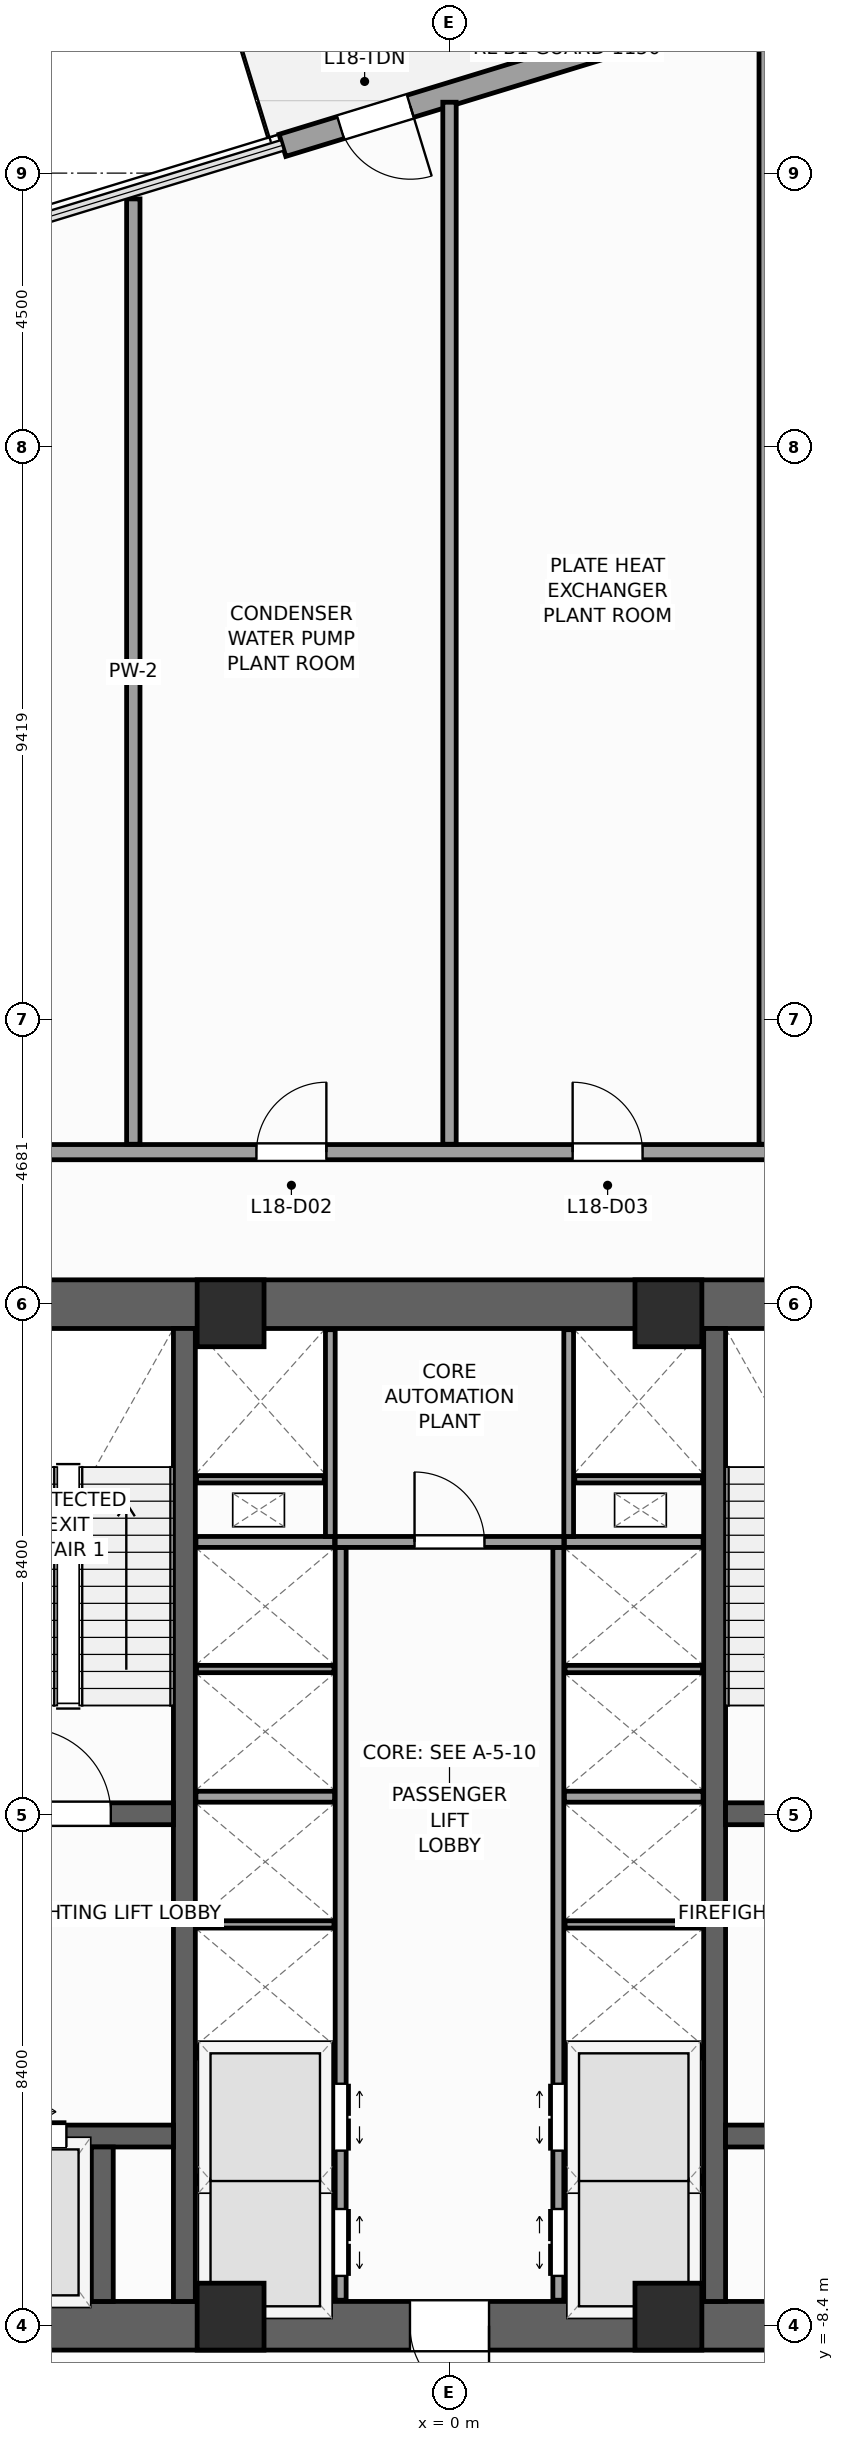
"""IFC4 building model, lengths in metres.
Left out: names, types, materials, properties, quantities, classifications, styles, units other than length and angle.
Written with IfcOpenShell. Run it as: python <this file> out.ifc"""

import sys

from ifc_helpers import new_model, si_unit, direction, frame, frame_2d, origin, origin_2d, place, context, subcontext, project, spatial, rectangle, extrude, source, transform, mapped, element, fill, save


model = new_model("IFC4")
c1 = context("Model", 3, precision=1e-05, world=origin(), true_north=direction((0.0, 1.0)))
c2 = subcontext(c1, "Body", "Model", "MODEL_VIEW")
j1 = project(units=[si_unit("LENGTHUNIT", "METRE"), si_unit("PLANEANGLEUNIT", "RADIAN")], contexts=[c1])
p1 = place(None, origin())
s1 = spatial("IfcSite", under=j1, at=p1, CompositionType="ELEMENT")
p2 = place(p1, origin())
s2 = spatial("IfcBuilding", under=s1, at=p2, CompositionType="ELEMENT")
p3 = place(p2, frame((0.0, 0.0, 78.0)))
s3 = spatial("IfcBuildingStorey", under=s2, at=p3, CompositionType="ELEMENT", Elevation=78.0)
p4 = place(p3, frame((-8.8, -8.4, 0.0), z_axis=(0.0, 0.0, 1.0), x_axis=(1.0, 0.0, 0.0)))
e1 = element("IfcWall", 1, at=p4, inside=s3, PredefinedType="SHEAR", context=c2, shape_type="SweptSolid", body=[
    extrude(rectangle(XDim=17.6, YDim=0.8, at=frame_2d((8.8, 0.0))), origin(), (0.0, 0.0, 1.0), 5.2),
])
p5 = place(p4, frame((8.15, 0.0, 0.0)))
e2 = element("IfcOpeningElement", 2, at=p5, cuts=e1, PredefinedType="OPENING", context=c2, shape_type="SweptSolid", body=[
    extrude(rectangle(XDim=1.3, YDim=2.2, at=frame_2d((0.65, 1.1))), frame((0.0, 0.41, 0.0), z_axis=(0.0, -1.0, 0.0), x_axis=(1.0, 0.0, 0.0)), (0.0, 0.0, 1.0), 0.82),
])
p6 = place(p3, frame((-8.8, 8.4, 0.0), z_axis=(0.0, 0.0, 1.0), x_axis=(1.0, 0.0, 0.0)))
e3 = element("IfcWall", 3, at=p6, inside=s3, PredefinedType="SHEAR", context=c2, shape_type="SweptSolid", body=[
    extrude(rectangle(XDim=17.6, YDim=0.8, at=frame_2d((8.8, 0.0))), origin(), (0.0, 0.0, 1.0), 5.2),
])
for number, where, z_axis, x_axis in (
    (4, (-4.36, -8.0, 0.0), (0.0, 0.0, 1.0), (0.0, 1.0, 0.0)),
    (5, (4.36, -8.0, 0.0), (0.0, 0.0, 1.0), (0.0, 1.0, 0.0)),
):
    element("IfcWall", number, at=place(p3, frame(where, z_axis=z_axis, x_axis=x_axis)), inside=s3, PredefinedType="SHEAR", context=c2, shape_type="SweptSolid", body=[
        extrude(rectangle(XDim=16.0, YDim=0.36, at=frame_2d((8.0, 0.0))), origin(), (0.0, 0.0, 1.0), 5.2),
    ])
p7 = place(p3, frame((-8.0, 0.02, 0.0), z_axis=(0.0, 0.0, 1.0), x_axis=(1.0, 0.0, 0.0)))
e6 = element("IfcWall", 6, at=p7, inside=s3, PredefinedType="SHEAR", context=c2, shape_type="SweptSolid", body=[
    extrude(rectangle(XDim=3.46, YDim=0.36, at=frame_2d((1.73, 0.0))), origin(), (0.0, 0.0, 1.0), 5.2),
])
p8 = place(p7, frame((1.03, 0.0, 0.0)))
e7 = element("IfcOpeningElement", 7, at=p8, cuts=e6, PredefinedType="OPENING", context=c2, shape_type="SweptSolid", body=[
    extrude(rectangle(XDim=1.4, YDim=2.2, at=frame_2d((0.7, 1.1))), frame((0.0, 0.19, 0.0), z_axis=(0.0, -1.0, 0.0), x_axis=(1.0, 0.0, 0.0)), (0.0, 0.0, 1.0), 0.38),
])
p9 = place(p3, frame((4.54, 0.02, 0.0), z_axis=(0.0, 0.0, 1.0), x_axis=(1.0, 0.0, 0.0)))
e8 = element("IfcWall", 8, at=p9, inside=s3, PredefinedType="SHEAR", context=c2, shape_type="SweptSolid", body=[
    extrude(rectangle(XDim=3.46, YDim=0.36, at=frame_2d((1.73, 0.0))), origin(), (0.0, 0.0, 1.0), 5.2),
])
p10 = place(p9, frame((1.03, 0.0, 0.0)))
e9 = element("IfcOpeningElement", 9, at=p10, cuts=e8, PredefinedType="OPENING", context=c2, shape_type="SweptSolid", body=[
    extrude(rectangle(XDim=1.4, YDim=2.2, at=frame_2d((0.7, 1.1))), frame((0.0, 0.19, 0.0), z_axis=(0.0, -1.0, 0.0), x_axis=(1.0, 0.0, 0.0)), (0.0, 0.0, 1.0), 0.38),
])
p11 = place(p3, frame((-8.0, -5.28, 0.0), z_axis=(0.0, 0.0, 1.0), x_axis=(1.0, 0.0, 0.0)))
e10 = element("IfcWall", 10, at=p11, inside=s3, PredefinedType="SHEAR", context=c2, shape_type="SweptSolid", body=[
    extrude(rectangle(XDim=3.46, YDim=0.36, at=frame_2d((1.73, 0.0))), origin(), (0.0, 0.0, 1.0), 5.2),
])
p12 = place(p11, frame((0.5, 0.0, 0.0)))
e11 = element("IfcOpeningElement", 11, at=p12, cuts=e10, PredefinedType="OPENING", context=c2, shape_type="SweptSolid", body=[
    extrude(rectangle(XDim=1.2, YDim=2.25, at=frame_2d((0.6, 1.125))), frame((0.0, 0.19, 0.0), z_axis=(0.0, -1.0, 0.0), x_axis=(1.0, 0.0, 0.0)), (0.0, 0.0, 1.0), 0.38),
])
p13 = place(p3, frame((4.54, -5.28, 0.0), z_axis=(0.0, 0.0, 1.0), x_axis=(1.0, 0.0, 0.0)))
e12 = element("IfcWall", 12, at=p13, inside=s3, PredefinedType="SHEAR", context=c2, shape_type="SweptSolid", body=[
    extrude(rectangle(XDim=3.46, YDim=0.36, at=frame_2d((1.73, 0.0))), origin(), (0.0, 0.0, 1.0), 5.2),
])
p14 = place(p13, frame((1.76, 0.0, 0.0)))
e13 = element("IfcOpeningElement", 13, at=p14, cuts=e12, PredefinedType="OPENING", context=c2, shape_type="SweptSolid", body=[
    extrude(rectangle(XDim=1.2, YDim=2.25, at=frame_2d((0.6, 1.125))), frame((0.0, 0.19, 0.0), z_axis=(0.0, -1.0, 0.0), x_axis=(1.0, 0.0, 0.0)), (0.0, 0.0, 1.0), 0.38),
])
p15 = place(p3, frame((-5.71, -8.0, 0.0), z_axis=(0.0, 0.0, 1.0), x_axis=(0.0, 1.0, 0.0)))
e14 = element("IfcWall", 14, at=p15, inside=s3, PredefinedType="SHEAR", context=c2, shape_type="SweptSolid", body=[
    extrude(rectangle(XDim=2.54, YDim=0.36, at=frame_2d((1.27, 0.0))), origin(), (0.0, 0.0, 1.0), 5.2),
])
m1 = source(origin(), c2, "Body", "SweptSolid", [
    extrude(rectangle(XDim=1.1, YDim=1.1, at=origin_2d()), origin(), (0.0, 0.0, 1.0), 5.2),
])
for number, where, z_axis, x_axis in (
    (15, (-3.6, -8.25, 0.0), (0.0, 0.0, 1.0), (1.0, 0.0, 0.0)),
    (16, (3.6, -8.25, 0.0), (0.0, 0.0, 1.0), (1.0, 0.0, 0.0)),
    (17, (-3.6, 8.25, 0.0), (0.0, 0.0, 1.0), (1.0, 0.0, 0.0)),
    (18, (3.6, 8.25, 0.0), (0.0, 0.0, 1.0), (1.0, 0.0, 0.0)),
):
    element("IfcColumn", number, at=place(p3, frame(where, z_axis=z_axis, x_axis=x_axis)), inside=s3, PredefinedType="PILASTER", context=c2, shape_type="MappedRepresentation", body=[
        mapped(m1, transform((0.0, 0.0, 0.0), scale=1.0)),
    ])
p16 = place(p3, frame((14.265, 32.658, 0.0), z_axis=(0.0, 0.0, 1.0), x_axis=(-0.956302978664, -0.292377517944, 0.0)))
e19 = element("IfcWall", 19, at=p16, inside=s3, PredefinedType="STANDARD", context=c2, shape_type="SweptSolid", body=[
    extrude(rectangle(XDim=17.79, YDim=0.38, at=frame_2d((8.895, 0.0))), origin(), (0.0, 0.0, 1.0), 4.34),
])
p17 = place(p16, frame((15.59, 0.0, 0.0)))
e20 = element("IfcOpeningElement", 20, at=p17, cuts=e19, PredefinedType="OPENING", context=c2, shape_type="SweptSolid", body=[
    extrude(rectangle(XDim=1.2, YDim=2.3, at=frame_2d((0.6, 1.15))), frame((0.0, 0.2, 0.0), z_axis=(0.0, -1.0, 0.0), x_axis=(1.0, 0.0, 0.0)), (0.0, 0.0, 1.0), 0.4),
])
p18 = place(p3, frame((-1.79, -7.98, 0.0), z_axis=(0.0, 0.0, 1.0), x_axis=(0.0, 1.0, 0.0)))
e21 = element("IfcWall", 21, at=p18, inside=s3, PredefinedType="PARTITIONING", context=c2, shape_type="SweptSolid", body=[
    extrude(rectangle(XDim=12.38, YDim=0.18, at=frame_2d((6.19, 0.0))), origin(), (0.0, 0.0, 1.0), 4.94),
])
p19 = place(p18, frame((0.4, 0.0, 0.0)))
e22 = element("IfcOpeningElement", 22, at=p19, cuts=e21, PredefinedType="OPENING", context=c2, shape_type="SweptSolid", body=[
    extrude(rectangle(XDim=1.1, YDim=2.2, at=frame_2d((0.55, 1.1))), frame((0.0, 0.1, 0.0), z_axis=(0.0, -1.0, 0.0), x_axis=(1.0, 0.0, 0.0)), (0.0, 0.0, 1.0), 0.2),
])
p20 = place(p18, frame((2.46, 0.0, 0.0)))
e23 = element("IfcOpeningElement", 23, at=p20, cuts=e21, PredefinedType="OPENING", context=c2, shape_type="SweptSolid", body=[
    extrude(rectangle(XDim=1.1, YDim=2.2, at=frame_2d((0.55, 1.1))), frame((0.0, 0.1, 0.0), z_axis=(0.0, -1.0, 0.0), x_axis=(1.0, 0.0, 0.0)), (0.0, 0.0, 1.0), 0.2),
])
p21 = place(p3, frame((1.79, -7.98, 0.0), z_axis=(0.0, 0.0, 1.0), x_axis=(0.0, 1.0, 0.0)))
e24 = element("IfcWall", 24, at=p21, inside=s3, PredefinedType="PARTITIONING", context=c2, shape_type="SweptSolid", body=[
    extrude(rectangle(XDim=12.38, YDim=0.18, at=frame_2d((6.19, 0.0))), origin(), (0.0, 0.0, 1.0), 4.94),
])
p22 = place(p21, frame((0.4, 0.0, 0.0)))
e25 = element("IfcOpeningElement", 25, at=p22, cuts=e24, PredefinedType="OPENING", context=c2, shape_type="SweptSolid", body=[
    extrude(rectangle(XDim=1.1, YDim=2.2, at=frame_2d((0.55, 1.1))), frame((0.0, 0.1, 0.0), z_axis=(0.0, -1.0, 0.0), x_axis=(1.0, 0.0, 0.0)), (0.0, 0.0, 1.0), 0.2),
])
p23 = place(p21, frame((2.46, 0.0, 0.0)))
e26 = element("IfcOpeningElement", 26, at=p23, cuts=e24, PredefinedType="OPENING", context=c2, shape_type="SweptSolid", body=[
    extrude(rectangle(XDim=1.1, YDim=2.2, at=frame_2d((0.55, 1.1))), frame((0.0, 0.1, 0.0), z_axis=(0.0, -1.0, 0.0), x_axis=(1.0, 0.0, 0.0)), (0.0, 0.0, 1.0), 0.2),
])
p24 = place(p3, frame((-1.88, 4.49, 0.0), z_axis=(0.0, 0.0, 1.0), x_axis=(1.0, 0.0, 0.0)))
e27 = element("IfcWall", 27, at=p24, inside=s3, PredefinedType="PARTITIONING", context=c2, shape_type="SweptSolid", body=[
    extrude(rectangle(XDim=3.76, YDim=0.18, at=frame_2d((1.88, 0.0))), origin(), (0.0, 0.0, 1.0), 4.94),
])
p25 = place(p24, frame((1.305, 0.0, 0.0)))
e28 = element("IfcOpeningElement", 28, at=p25, cuts=e27, PredefinedType="OPENING", context=c2, shape_type="SweptSolid", body=[
    extrude(rectangle(XDim=1.15, YDim=2.25, at=frame_2d((0.575, 1.125))), frame((0.0, 0.1, 0.0), z_axis=(0.0, -1.0, 0.0), x_axis=(1.0, 0.0, 0.0)), (0.0, 0.0, 1.0), 0.2),
])
for number, where, z_axis, x_axis in (
    (29, (-4.17, -3.9, 0.0), (0.0, 0.0, 1.0), (1.0, 0.0, 0.0)),
    (30, (1.89, -3.9, 0.0), (0.0, 0.0, 1.0), (1.0, 0.0, 0.0)),
    (31, (-4.17, 0.3, 0.0), (0.0, 0.0, 1.0), (1.0, 0.0, 0.0)),
    (32, (1.89, 0.3, 0.0), (0.0, 0.0, 1.0), (1.0, 0.0, 0.0)),
    (33, (-4.17, 4.49, 0.0), (0.0, 0.0, 1.0), (1.0, 0.0, 0.0)),
    (34, (1.89, 4.49, 0.0), (0.0, 0.0, 1.0), (1.0, 0.0, 0.0)),
):
    element("IfcWall", number, at=place(p3, frame(where, z_axis=z_axis, x_axis=x_axis)), inside=s3, PredefinedType="PARTITIONING", context=c2, shape_type="SweptSolid", body=[
        extrude(rectangle(XDim=2.28, YDim=0.18, at=frame_2d((1.14, 0.0))), origin(), (0.0, 0.0, 1.0), 4.94),
    ])
for number, where, z_axis, x_axis in (
    (35, (-4.16, -6.0, 0.0), (0.0, 0.0, 1.0), (1.0, 0.0, 0.0)),
    (36, (1.9, -6.0, 0.0), (0.0, 0.0, 1.0), (1.0, 0.0, 0.0)),
    (37, (-4.16, -1.8, 0.0), (0.0, 0.0, 1.0), (1.0, 0.0, 0.0)),
    (38, (1.9, -1.8, 0.0), (0.0, 0.0, 1.0), (1.0, 0.0, 0.0)),
    (39, (-4.16, 2.4, 0.0), (0.0, 0.0, 1.0), (1.0, 0.0, 0.0)),
    (40, (1.9, 2.4, 0.0), (0.0, 0.0, 1.0), (1.0, 0.0, 0.0)),
):
    element("IfcWall", number, at=place(p3, frame(where, z_axis=z_axis, x_axis=x_axis)), inside=s3, PredefinedType="PARTITIONING", context=c2, shape_type="SweptSolid", body=[
        extrude(rectangle(XDim=2.26, YDim=0.12, at=frame_2d((1.13, 0.0))), origin(), (0.0, 0.0, 1.0), 4.94),
    ])
for number, where, z_axis, x_axis in (
    (41, (-1.96, 4.58, 0.0), (0.0, 0.0, 1.0), (0.0, 1.0, 0.0)),
    (42, (1.96, 4.58, 0.0), (0.0, 0.0, 1.0), (0.0, 1.0, 0.0)),
):
    element("IfcWall", number, at=place(p3, frame(where, z_axis=z_axis, x_axis=x_axis)), inside=s3, PredefinedType="PARTITIONING", context=c2, shape_type="SweptSolid", body=[
        extrude(rectangle(XDim=3.4, YDim=0.16, at=frame_2d((1.7, 0.0))), origin(), (0.0, 0.0, 1.0), 4.94),
    ])
for number, where, z_axis, x_axis in (
    (43, (-4.16, 5.52, 0.0), (0.0, 0.0, 1.0), (1.0, 0.0, 0.0)),
    (44, (2.06, 5.52, 0.0), (0.0, 0.0, 1.0), (1.0, 0.0, 0.0)),
):
    element("IfcWall", number, at=place(p3, frame(where, z_axis=z_axis, x_axis=x_axis)), inside=s3, PredefinedType="PARTITIONING", context=c2, shape_type="SweptSolid", body=[
        extrude(rectangle(XDim=2.1, YDim=0.12, at=frame_2d((1.05, 0.0))), origin(), (0.0, 0.0, 1.0), 4.94),
    ])
p26 = place(p3, frame((-10.9, 10.9, 0.0), z_axis=(0.0, 0.0, 1.0), x_axis=(1.0, 0.0, 0.0)))
e45 = element("IfcWall", 45, at=p26, inside=s3, PredefinedType="PARTITIONING", context=c2, shape_type="SweptSolid", body=[
    extrude(rectangle(XDim=21.8, YDim=0.25, at=frame_2d((10.9, 0.0))), origin(), (0.0, 0.0, 1.0), 4.94),
])
p27 = place(p26, frame((2.439, 0.0, 0.0)))
e46 = element("IfcOpeningElement", 46, at=p27, cuts=e45, PredefinedType="OPENING", context=c2, shape_type="SweptSolid", body=[
    extrude(rectangle(XDim=1.15, YDim=2.25, at=frame_2d((0.575, 1.125))), frame((0.0, 0.135, 0.0), z_axis=(0.0, -1.0, 0.0), x_axis=(1.0, 0.0, 0.0)), (0.0, 0.0, 1.0), 0.27),
])
p28 = place(p26, frame((7.725, 0.0, 0.0)))
e47 = element("IfcOpeningElement", 47, at=p28, cuts=e45, PredefinedType="OPENING", context=c2, shape_type="SweptSolid", body=[
    extrude(rectangle(XDim=1.15, YDim=2.25, at=frame_2d((0.575, 1.125))), frame((0.0, 0.135, 0.0), z_axis=(0.0, -1.0, 0.0), x_axis=(1.0, 0.0, 0.0)), (0.0, 0.0, 1.0), 0.27),
])
p29 = place(p26, frame((12.925, 0.0, 0.0)))
e48 = element("IfcOpeningElement", 48, at=p29, cuts=e45, PredefinedType="OPENING", context=c2, shape_type="SweptSolid", body=[
    extrude(rectangle(XDim=1.15, YDim=2.25, at=frame_2d((0.575, 1.125))), frame((0.0, 0.135, 0.0), z_axis=(0.0, -1.0, 0.0), x_axis=(1.0, 0.0, 0.0)), (0.0, 0.0, 1.0), 0.27),
])
p30 = place(p26, frame((18.21, 0.0, 0.0)))
e49 = element("IfcOpeningElement", 49, at=p30, cuts=e45, PredefinedType="OPENING", context=c2, shape_type="SweptSolid", body=[
    extrude(rectangle(XDim=1.15, YDim=2.25, at=frame_2d((0.575, 1.125))), frame((0.0, 0.135, 0.0), z_axis=(0.0, -1.0, 0.0), x_axis=(1.0, 0.0, 0.0)), (0.0, 0.0, 1.0), 0.27),
])
p31 = place(p3, frame((-5.2, 11.03, 0.0), z_axis=(0.0, 0.0, 1.0), x_axis=(0.0, 1.0, 0.0)))
e50 = element("IfcWall", 50, at=p31, inside=s3, PredefinedType="PARTITIONING", context=c2, shape_type="SweptSolid", body=[
    extrude(rectangle(XDim=15.546, YDim=0.22, at=frame_2d((7.773, 0.0))), origin(), (0.0, 0.0, 1.0), 4.94),
])
p32 = place(p3, frame((0.0, 11.03, 0.0), z_axis=(0.0, 0.0, 1.0), x_axis=(0.0, 1.0, 0.0)))
e51 = element("IfcWall", 51, at=p32, inside=s3, PredefinedType="PARTITIONING", context=c2, shape_type="SweptSolid", body=[
    extrude(rectangle(XDim=17.136, YDim=0.22, at=frame_2d((8.568, 0.0))), origin(), (0.0, 0.0, 1.0), 4.94),
])
p33 = place(p3, frame((5.2, 11.03, 0.0), z_axis=(0.0, 0.0, 1.0), x_axis=(0.0, 1.0, 0.0)))
e52 = element("IfcWall", 52, at=p33, inside=s3, PredefinedType="PARTITIONING", context=c2, shape_type="SweptSolid", body=[
    extrude(rectangle(XDim=18.726, YDim=0.22, at=frame_2d((9.363, 0.0))), origin(), (0.0, 0.0, 1.0), 4.94),
])
m2 = source(origin(), c2, "Body", "SweptSolid", [
    extrude(rectangle(XDim=1.2, YDim=2.3, at=frame_2d((0.6, 1.15))), frame((0.0, 0.025, 0.0), z_axis=(0.0, -1.0, 0.0), x_axis=(1.0, 0.0, 0.0)), (0.0, 0.0, 1.0), 0.05),
])
p34 = place(p17, origin())
e53 = element("IfcDoor", 53, at=p34, inside=s3, OperationType="SINGLE_SWING_LEFT", PredefinedType="DOOR", context=c2, shape_type="MappedRepresentation", body=[
    mapped(m2, transform((0.0, 0.0, 0.0), scale=1.0)),
])
fill(e20, e53)
m3 = source(origin(), c2, "Body", "SweptSolid", [
    extrude(rectangle(XDim=1.4, YDim=2.2, at=frame_2d((0.7, 1.1))), frame((0.0, 0.025, 0.0), z_axis=(0.0, -1.0, 0.0), x_axis=(1.0, 0.0, 0.0)), (0.0, 0.0, 1.0), 0.05),
])
p35 = place(p8, origin())
e54 = element("IfcDoor", 54, at=p35, inside=s3, OperationType="SINGLE_SWING_LEFT", PredefinedType="DOOR", context=c2, shape_type="MappedRepresentation", body=[
    mapped(m3, transform((0.0, 0.0, 0.0), scale=1.0)),
])
fill(e7, e54)
m4 = source(origin(), c2, "Body", "SweptSolid", [
    extrude(rectangle(XDim=1.3, YDim=2.2, at=frame_2d((0.65, 1.1))), frame((0.0, 0.025, 0.0), z_axis=(0.0, -1.0, 0.0), x_axis=(1.0, 0.0, 0.0)), (0.0, 0.0, 1.0), 0.05),
])
p36 = place(p5, frame((1.3, 0.0, 0.0), z_axis=(0.0, 0.0, 1.0), x_axis=(-1.0, 0.0, 0.0)))
e55 = element("IfcDoor", 55, at=p36, inside=s3, OperationType="SINGLE_SWING_RIGHT", PredefinedType="DOOR", context=c2, shape_type="MappedRepresentation", body=[
    mapped(m4, transform((0.0, 0.0, 0.0), scale=1.0)),
])
fill(e2, e55)
m5 = source(origin(), c2, "Body", "SweptSolid", [
    extrude(rectangle(XDim=1.2, YDim=2.25, at=frame_2d((0.6, 1.125))), frame((0.0, 0.025, 0.0), z_axis=(0.0, -1.0, 0.0), x_axis=(1.0, 0.0, 0.0)), (0.0, 0.0, 1.0), 0.05),
])
p37 = place(p12, origin())
e56 = element("IfcDoor", 56, at=p37, inside=s3, OperationType="DOUBLE_DOOR_SLIDING", PredefinedType="DOOR", context=c2, shape_type="MappedRepresentation", body=[
    mapped(m5, transform((0.0, 0.0, 0.0), scale=1.0)),
])
fill(e11, e56)
m6 = source(origin(), c2, "Body", "SweptSolid", [
    extrude(rectangle(XDim=1.1, YDim=2.2, at=frame_2d((0.55, 1.1))), frame((0.0, 0.025, 0.0), z_axis=(0.0, -1.0, 0.0), x_axis=(1.0, 0.0, 0.0)), (0.0, 0.0, 1.0), 0.05),
])
p38 = place(p19, frame((1.1, 0.0, 0.0), z_axis=(0.0, 0.0, 1.0), x_axis=(-1.0, 0.0, 0.0)))
e57 = element("IfcDoor", 57, at=p38, inside=s3, OperationType="DOUBLE_DOOR_SLIDING", PredefinedType="DOOR", context=c2, shape_type="MappedRepresentation", body=[
    mapped(m6, transform((0.0, 0.0, 0.0), scale=1.0)),
])
fill(e22, e57)
p39 = place(p20, frame((1.1, 0.0, 0.0), z_axis=(0.0, 0.0, 1.0), x_axis=(-1.0, 0.0, 0.0)))
e58 = element("IfcDoor", 58, at=p39, inside=s3, OperationType="DOUBLE_DOOR_SLIDING", PredefinedType="DOOR", context=c2, shape_type="MappedRepresentation", body=[
    mapped(m6, transform((0.0, 0.0, 0.0), scale=1.0)),
])
fill(e23, e58)
p40 = place(p22, origin())
e59 = element("IfcDoor", 59, at=p40, inside=s3, OperationType="DOUBLE_DOOR_SLIDING", PredefinedType="DOOR", context=c2, shape_type="MappedRepresentation", body=[
    mapped(m6, transform((0.0, 0.0, 0.0), scale=1.0)),
])
fill(e25, e59)
p41 = place(p23, origin())
e60 = element("IfcDoor", 60, at=p41, inside=s3, OperationType="DOUBLE_DOOR_SLIDING", PredefinedType="DOOR", context=c2, shape_type="MappedRepresentation", body=[
    mapped(m6, transform((0.0, 0.0, 0.0), scale=1.0)),
])
fill(e26, e60)
m7 = source(origin(), c2, "Body", "SweptSolid", [
    extrude(rectangle(XDim=1.15, YDim=2.25, at=frame_2d((0.575, 1.125))), frame((0.0, 0.025, 0.0), z_axis=(0.0, -1.0, 0.0), x_axis=(1.0, 0.0, 0.0)), (0.0, 0.0, 1.0), 0.05),
])
p42 = place(p25, origin())
e61 = element("IfcDoor", 61, at=p42, inside=s3, OperationType="SINGLE_SWING_LEFT", PredefinedType="DOOR", context=c2, shape_type="MappedRepresentation", body=[
    mapped(m7, transform((0.0, 0.0, 0.0), scale=1.0)),
])
fill(e28, e61)
p43 = place(p28, origin())
e62 = element("IfcDoor", 62, at=p43, inside=s3, OperationType="SINGLE_SWING_RIGHT", PredefinedType="DOOR", context=c2, shape_type="MappedRepresentation", body=[
    mapped(m7, transform((0.0, 0.0, 0.0), scale=1.0)),
])
fill(e47, e62)
p44 = place(p29, origin())
e63 = element("IfcDoor", 63, at=p44, inside=s3, OperationType="SINGLE_SWING_LEFT", PredefinedType="DOOR", context=c2, shape_type="MappedRepresentation", body=[
    mapped(m7, transform((0.0, 0.0, 0.0), scale=1.0)),
])
fill(e48, e63)
save(model, sys.argv[1])
